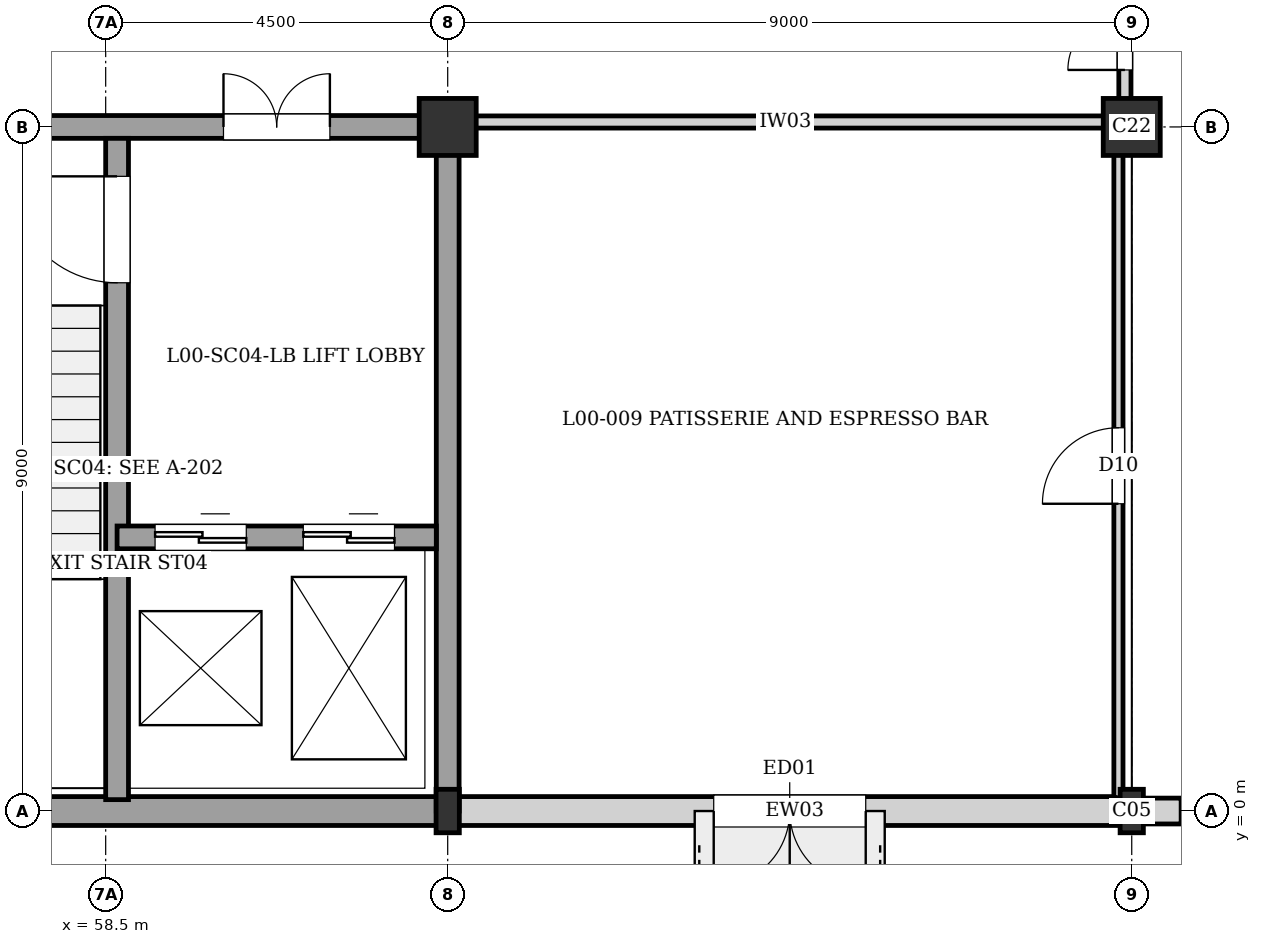
"""IFC4 building model, lengths in metres.
Left out: names, types, materials, properties, quantities, classifications, styles, units other than length and angle.
Written with IfcOpenShell. Run it as: python <this file> out.ifc"""

import sys

from ifc_helpers import new_model, si_unit, direction, frame, frame_2d, origin, origin_2d, place, context, subcontext, project, spatial, rectangle, i_section, extrude, element, fill, save


model = new_model("IFC4")
c1 = context("Model", 3, precision=1e-05, world=origin(), true_north=direction((0.0, 1.0)))
c2 = subcontext(c1, "Body", "Model", "MODEL_VIEW")
j1 = project(units=[si_unit("LENGTHUNIT", "METRE"), si_unit("PLANEANGLEUNIT", "RADIAN")], contexts=[c1])
p1 = place(None, origin())
s1 = spatial("IfcSite", under=j1, at=p1, CompositionType="ELEMENT")
p2 = place(p1, origin())
s2 = spatial("IfcBuilding", under=s1, at=p2, CompositionType="ELEMENT")
p3 = place(p2, origin())
s3 = spatial("IfcBuildingStorey", under=s2, at=p3, CompositionType="ELEMENT", Elevation=0.0)
p4 = place(p3, frame((63.0, 0.0, 0.0), z_axis=(0.0, 0.0, 1.0), x_axis=(1.0, 0.0, 0.0)))
e1 = element("IfcColumn", 1, at=p4, inside=s3, PredefinedType="COLUMN", context=c2, shape_type="SweptSolid", body=[
    extrude(i_section(OverallWidth=0.306, OverallDepth=0.572, WebThickness=0.021, FlangeThickness=0.04, at=origin_2d()), origin(), (0.0, 0.0, 1.0), 4.32),
])
p5 = place(p3, frame((63.0, 9.0, 0.0), z_axis=(0.0, 0.0, 1.0), x_axis=(1.0, 0.0, 0.0)))
e2 = element("IfcColumn", 2, at=p5, inside=s3, PredefinedType="COLUMN", context=c2, shape_type="SweptSolid", body=[
    extrude(rectangle(XDim=0.75, YDim=0.75, at=origin_2d()), origin(), (0.0, 0.0, 1.0), 4.32),
])
p6 = place(p3, frame((72.0, 0.0, 0.0), z_axis=(0.0, 0.0, 1.0), x_axis=(1.0, 0.0, 0.0)))
e3 = element("IfcColumn", 3, at=p6, inside=s3, PredefinedType="COLUMN", context=c2, shape_type="SweptSolid", body=[
    extrude(i_section(OverallWidth=0.306, OverallDepth=0.572, WebThickness=0.021, FlangeThickness=0.04, at=origin_2d()), origin(), (0.0, 0.0, 1.0), 4.32),
])
p7 = place(p3, frame((72.0, 9.0, 0.0), z_axis=(0.0, 0.0, 1.0), x_axis=(1.0, 0.0, 0.0)))
e4 = element("IfcColumn", 4, at=p7, inside=s3, PredefinedType="COLUMN", context=c2, shape_type="SweptSolid", body=[
    extrude(rectangle(XDim=0.75, YDim=0.75, at=origin_2d()), origin(), (0.0, 0.0, 1.0), 4.32),
])
p8 = place(p3, frame((72.0, 0.0, 0.0), z_axis=(0.0, 0.0, 1.0), x_axis=(-1.0, 0.0, 0.0)))
e5 = element("IfcWall", 5, at=p8, inside=s3, PredefinedType="SOLIDWALL", context=c2, shape_type="SweptSolid", body=[
    extrude(rectangle(XDim=8.87, YDim=0.38, at=frame_2d((4.435, 0.0))), origin(), (0.0, 0.0, 1.0), 3.755),
])
p9 = place(p8, frame((3.5, 0.0, 0.0)))
e6 = element("IfcOpeningElement", 6, at=p9, cuts=e5, PredefinedType="OPENING", context=c2, shape_type="SweptSolid", body=[
    extrude(rectangle(XDim=2.0, YDim=2.4, at=frame_2d((1.0, 1.2))), frame((0.0, 0.2, 0.0), z_axis=(0.0, -1.0, 0.0), x_axis=(1.0, 0.0, 0.0)), (0.0, 0.0, 1.0), 0.4),
])
p10 = place(p3, frame((63.0, 0.0, 0.0), z_axis=(0.0, 0.0, 1.0), x_axis=(-1.0, 0.0, 0.0)))
e7 = element("IfcWall", 7, at=p10, inside=s3, PredefinedType="SOLIDWALL", context=c2, shape_type="SweptSolid", body=[
    extrude(rectangle(XDim=9.0, YDim=0.38, at=frame_2d((4.5, 0.0))), origin(), (0.0, 0.0, 1.0), 4.055),
])
p11 = place(p3, frame((72.65, 0.0, 0.0), z_axis=(0.0, 0.0, 1.0), x_axis=(-1.0, 0.0, 0.0)))
e8 = element("IfcWall", 8, at=p11, inside=s3, PredefinedType="SOLIDWALL", context=c2, shape_type="SweptSolid", body=[
    extrude(rectangle(XDim=0.65, YDim=0.34, at=frame_2d((0.325, 0.0))), origin(), (0.0, 0.0, 1.0), 3.695),
])
p12 = place(p3, frame((63.0, 0.0, 0.0), z_axis=(0.0, 0.0, 1.0), x_axis=(0.0, 1.0, 0.0)))
e9 = element("IfcWall", 9, at=p12, inside=s3, PredefinedType="SHEAR", context=c2, shape_type="SweptSolid", body=[
    extrude(rectangle(XDim=9.0, YDim=0.3, at=frame_2d((4.5, 0.0))), origin(), (0.0, 0.0, 1.0), 4.055),
])
p13 = place(p3, frame((54.0, 9.0, 0.0), z_axis=(0.0, 0.0, 1.0), x_axis=(1.0, 0.0, 0.0)))
e10 = element("IfcWall", 10, at=p13, inside=s3, PredefinedType="SHEAR", context=c2, shape_type="SweptSolid", body=[
    extrude(rectangle(XDim=9.0, YDim=0.3, at=frame_2d((4.5, 0.0))), origin(), (0.0, 0.0, 1.0), 4.055),
])
p14 = place(p13, frame((6.05, 0.0, 0.0)))
e11 = element("IfcOpeningElement", 11, at=p14, cuts=e10, PredefinedType="OPENING", context=c2, shape_type="SweptSolid", body=[
    extrude(rectangle(XDim=1.4, YDim=2.02, at=frame_2d((0.7, 1.01))), frame((0.0, 0.16, 0.0), z_axis=(0.0, -1.0, 0.0), x_axis=(1.0, 0.0, 0.0)), (0.0, 0.0, 1.0), 0.32),
])
p15 = place(p3, frame((58.65, 0.15, 0.0), z_axis=(0.0, 0.0, 1.0), x_axis=(0.0, 1.0, 0.0)))
e12 = element("IfcWall", 12, at=p15, inside=s3, PredefinedType="SHEAR", context=c2, shape_type="SweptSolid", body=[
    extrude(rectangle(XDim=8.7, YDim=0.3, at=frame_2d((4.35, 0.0))), origin(), (0.0, 0.0, 1.0), 4.055),
])
p16 = place(p15, frame((6.8, 0.0, 0.0)))
e13 = element("IfcOpeningElement", 13, at=p16, cuts=e12, PredefinedType="OPENING", context=c2, shape_type="SweptSolid", body=[
    extrude(rectangle(XDim=1.4, YDim=2.02, at=frame_2d((0.7, 1.01))), frame((0.0, 0.16, 0.0), z_axis=(0.0, -1.0, 0.0), x_axis=(1.0, 0.0, 0.0)), (0.0, 0.0, 1.0), 0.32),
])
p17 = place(p3, frame((58.65, 3.6, 0.0), z_axis=(0.0, 0.0, 1.0), x_axis=(1.0, 0.0, 0.0)))
e14 = element("IfcWall", 14, at=p17, inside=s3, PredefinedType="SHEAR", context=c2, shape_type="SweptSolid", body=[
    extrude(rectangle(XDim=4.2, YDim=0.3, at=frame_2d((2.1, 0.0))), origin(), (0.0, 0.0, 1.0), 4.055),
])
p18 = place(p17, frame((0.5, 0.0, 0.0)))
e15 = element("IfcOpeningElement", 15, at=p18, cuts=e14, PredefinedType="OPENING", context=c2, shape_type="SweptSolid", body=[
    extrude(rectangle(XDim=1.2, YDim=2.2, at=frame_2d((0.6, 1.1))), frame((0.0, 0.16, 0.0), z_axis=(0.0, -1.0, 0.0), x_axis=(1.0, 0.0, 0.0)), (0.0, 0.0, 1.0), 0.32),
])
p19 = place(p17, frame((2.45, 0.0, 0.0)))
e16 = element("IfcOpeningElement", 16, at=p19, cuts=e14, PredefinedType="OPENING", context=c2, shape_type="SweptSolid", body=[
    extrude(rectangle(XDim=1.2, YDim=2.2, at=frame_2d((0.6, 1.1))), frame((0.0, 0.16, 0.0), z_axis=(0.0, -1.0, 0.0), x_axis=(1.0, 0.0, 0.0)), (0.0, 0.0, 1.0), 0.32),
])
p20 = place(p3, frame((63.155, 9.065, 0.0), z_axis=(0.0, 0.0, 1.0), x_axis=(1.0, 0.0, 0.0)))
e17 = element("IfcWall", 17, at=p20, inside=s3, PredefinedType="PARTITIONING", context=c2, shape_type="SweptSolid", body=[
    extrude(rectangle(XDim=8.575, YDim=0.16, at=frame_2d((4.288, 0.0))), origin(), (0.0, 0.0, 1.0), 3.615),
])
p21 = place(p3, frame((71.91, 9.22, 0.0), z_axis=(0.0, 0.0, 1.0), x_axis=(0.0, 1.0, 0.0)))
e18 = element("IfcWall", 18, at=p21, inside=s3, PredefinedType="PARTITIONING", context=c2, shape_type="SweptSolid", body=[
    extrude(rectangle(XDim=2.56, YDim=0.16, at=frame_2d((1.28, 0.0))), origin(), (0.0, 0.0, 1.0), 4.055),
])
p22 = place(p21, frame((0.53, 0.0, 0.0)))
e19 = element("IfcOpeningElement", 19, at=p22, cuts=e18, PredefinedType="OPENING", context=c2, shape_type="SweptSolid", body=[
    extrude(rectangle(XDim=1.5, YDim=2.1, at=frame_2d((0.75, 1.05))), frame((0.0, 0.09, 0.0), z_axis=(0.0, -1.0, 0.0), x_axis=(1.0, 0.0, 0.0)), (0.0, 0.0, 1.0), 0.18),
])
p23 = place(p3, frame((71.825, 0.175, 0.0), z_axis=(0.0, 0.0, 1.0), x_axis=(0.0, 1.0, 0.0)))
e20 = element("IfcWall", 20, at=p23, inside=s3, PredefinedType="PARTITIONING", context=c2, shape_type="SweptSolid", body=[
    extrude(rectangle(XDim=8.735, YDim=0.12, at=frame_2d((4.367, 0.0))), origin(), (0.0, 0.0, 1.0), 4.055),
])
p24 = place(p23, frame((3.867, 0.0, 0.0)))
e21 = element("IfcOpeningElement", 21, at=p24, cuts=e20, PredefinedType="OPENING", context=c2, shape_type="SweptSolid", body=[
    extrude(rectangle(XDim=1.0, YDim=2.1, at=frame_2d((0.5, 1.05))), frame((0.0, 0.07, 0.0), z_axis=(0.0, -1.0, 0.0), x_axis=(1.0, 0.0, 0.0)), (0.0, 0.0, 1.0), 0.14),
])
p25 = place(p9, origin())
e22 = element("IfcDoor", 22, at=p25, inside=s3, OperationType="DOUBLE_DOOR_SINGLE_SWING", PredefinedType="DOOR", context=c2, shape_type="SweptSolid", body=[
    extrude(rectangle(XDim=2.0, YDim=2.4, at=frame_2d((1.0, 1.2))), frame((0.0, 0.025, 0.0), z_axis=(0.0, -1.0, 0.0), x_axis=(1.0, 0.0, 0.0)), (0.0, 0.0, 1.0), 0.05),
])
fill(e6, e22)
p26 = place(p14, origin())
e23 = element("IfcDoor", 23, at=p26, inside=s3, OperationType="DOUBLE_DOOR_SINGLE_SWING", PredefinedType="DOOR", context=c2, shape_type="SweptSolid", body=[
    extrude(rectangle(XDim=1.4, YDim=2.02, at=frame_2d((0.7, 1.01))), frame((0.0, 0.025, 0.0), z_axis=(0.0, -1.0, 0.0), x_axis=(1.0, 0.0, 0.0)), (0.0, 0.0, 1.0), 0.05),
])
fill(e11, e23)
p27 = place(p16, origin())
e24 = element("IfcDoor", 24, at=p27, inside=s3, OperationType="SINGLE_SWING_RIGHT", PredefinedType="DOOR", context=c2, shape_type="SweptSolid", body=[
    extrude(rectangle(XDim=1.4, YDim=2.02, at=frame_2d((0.7, 1.01))), frame((0.0, 0.025, 0.0), z_axis=(0.0, -1.0, 0.0), x_axis=(1.0, 0.0, 0.0)), (0.0, 0.0, 1.0), 0.05),
])
fill(e13, e24)
p28 = place(p18, origin())
e25 = element("IfcDoor", 25, at=p28, inside=s3, OperationType="DOUBLE_DOOR_SLIDING", PredefinedType="DOOR", context=c2, shape_type="SweptSolid", body=[
    extrude(rectangle(XDim=1.2, YDim=2.2, at=frame_2d((0.6, 1.1))), frame((0.0, 0.025, 0.0), z_axis=(0.0, -1.0, 0.0), x_axis=(1.0, 0.0, 0.0)), (0.0, 0.0, 1.0), 0.05),
])
fill(e15, e25)
p29 = place(p19, origin())
e26 = element("IfcDoor", 26, at=p29, inside=s3, OperationType="DOUBLE_DOOR_SLIDING", PredefinedType="DOOR", context=c2, shape_type="SweptSolid", body=[
    extrude(rectangle(XDim=1.2, YDim=2.2, at=frame_2d((0.6, 1.1))), frame((0.0, 0.025, 0.0), z_axis=(0.0, -1.0, 0.0), x_axis=(1.0, 0.0, 0.0)), (0.0, 0.0, 1.0), 0.05),
])
fill(e16, e26)
p30 = place(p22, origin())
e27 = element("IfcDoor", 27, at=p30, inside=s3, OperationType="DOUBLE_DOOR_SINGLE_SWING", PredefinedType="DOOR", context=c2, shape_type="SweptSolid", body=[
    extrude(rectangle(XDim=1.5, YDim=2.1, at=frame_2d((0.75, 1.05))), frame((0.0, 0.025, 0.0), z_axis=(0.0, -1.0, 0.0), x_axis=(1.0, 0.0, 0.0)), (0.0, 0.0, 1.0), 0.05),
])
fill(e19, e27)
p31 = place(p24, origin())
e28 = element("IfcDoor", 28, at=p31, inside=s3, OperationType="SINGLE_SWING_LEFT", PredefinedType="DOOR", context=c2, shape_type="SweptSolid", body=[
    extrude(rectangle(XDim=1.0, YDim=2.1, at=frame_2d((0.5, 1.05))), frame((0.0, 0.025, 0.0), z_axis=(0.0, -1.0, 0.0), x_axis=(1.0, 0.0, 0.0)), (0.0, 0.0, 1.0), 0.05),
])
fill(e21, e28)
save(model, sys.argv[1])
